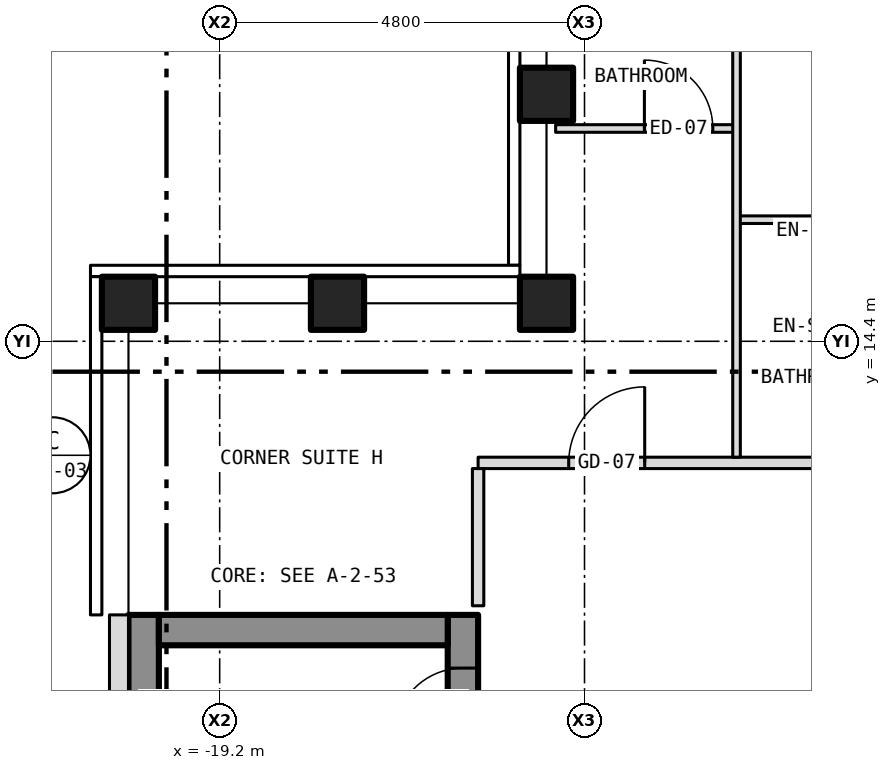
"""IFC4 building model, lengths in metres.
Left out: names, types, materials, properties, quantities, classifications, styles, units other than length and angle.
Written with IfcOpenShell. Run it as: python <this file> out.ifc"""

import sys

from ifc_helpers import new_model, si_unit, direction, frame, frame_2d, origin, origin_2d, place, context, subcontext, project, spatial, rectangle, hollow_rectangle, extrude, element, fill, save


model = new_model("IFC4")
c1 = context("Model", 3, precision=1e-05, world=origin(), true_north=direction((0.0, 1.0)))
c2 = subcontext(c1, "Body", "Model", "MODEL_VIEW")
j1 = project(units=[si_unit("LENGTHUNIT", "METRE"), si_unit("PLANEANGLEUNIT", "RADIAN")], contexts=[c1])
p1 = place(None, origin())
s1 = spatial("IfcSite", under=j1, at=p1, CompositionType="ELEMENT")
p2 = place(p1, origin())
s2 = spatial("IfcBuilding", under=s1, at=p2, CompositionType="ELEMENT")
p3 = place(p2, frame((0.0, 0.0, 194.5)))
s3 = spatial("IfcBuildingStorey", under=s2, at=p3, CompositionType="ELEMENT", Elevation=194.5)
for number, where, z_axis, x_axis in (
    (1, (-20.4, 14.9, -0.15), (0.0, 0.0, 1.0), (1.0, 0.0, 0.0)),
    (2, (-14.9, 14.9, -0.15), (0.0, 0.0, 1.0), (1.0, 0.0, 0.0)),
    (3, (-14.9, 17.65, -0.15), (0.0, 0.0, 1.0), (1.0, 0.0, 0.0)),
    (4, (-17.65, 14.9, -0.15), (0.0, 0.0, 1.0), (1.0, 0.0, 0.0)),
):
    element("IfcColumn", number, at=place(p3, frame(where, z_axis=z_axis, x_axis=x_axis)), inside=s3, PredefinedType="COLUMN", context=c2, shape_type="SweptSolid", body=[
        extrude(hollow_rectangle(XDim=0.7, YDim=0.7, WallThickness=0.04, at=origin_2d()), origin(), (0.0, 0.0, 1.0), 3.5),
    ])
p4 = place(p3, frame((-16.0, -10.8, 0.0), z_axis=(0.0, 0.0, 1.0), x_axis=(0.0, 1.0, 0.0)))
e5 = element("IfcWall", 5, at=p4, inside=s3, PredefinedType="SHEAR", context=c2, shape_type="SweptSolid", body=[
    extrude(rectangle(XDim=21.6, YDim=0.4, at=frame_2d((10.8, 0.0))), origin(), (0.0, 0.0, 1.0), 3.25),
])
p5 = place(p4, frame((9.4, 0.0, 0.0)))
e6 = element("IfcOpeningElement", 6, at=p5, cuts=e5, PredefinedType="OPENING", context=c2, shape_type="SweptSolid", body=[
    extrude(rectangle(XDim=1.1, YDim=2.1, at=frame_2d((0.55, 1.05))), frame((0.0, 0.212, 0.0), z_axis=(0.0, -1.0, 0.0), x_axis=(1.0, 0.0, 0.0)), (0.0, 0.0, 1.0), 0.424),
])
p6 = place(p4, frame((11.5, 0.0, 0.0)))
e7 = element("IfcOpeningElement", 7, at=p6, cuts=e5, PredefinedType="OPENING", context=c2, shape_type="SweptSolid", body=[
    extrude(rectangle(XDim=1.1, YDim=2.1, at=frame_2d((0.55, 1.05))), frame((0.0, 0.212, 0.0), z_axis=(0.0, -1.0, 0.0), x_axis=(1.0, 0.0, 0.0)), (0.0, 0.0, 1.0), 0.424),
])
p7 = place(p4, frame((13.6, 0.0, 0.0)))
e8 = element("IfcOpeningElement", 8, at=p7, cuts=e5, PredefinedType="OPENING", context=c2, shape_type="SweptSolid", body=[
    extrude(rectangle(XDim=1.1, YDim=2.1, at=frame_2d((0.55, 1.05))), frame((0.0, 0.212, 0.0), z_axis=(0.0, -1.0, 0.0), x_axis=(1.0, 0.0, 0.0)), (0.0, 0.0, 1.0), 0.424),
])
p8 = place(p4, frame((15.7, 0.0, 0.0)))
e9 = element("IfcOpeningElement", 9, at=p8, cuts=e5, PredefinedType="OPENING", context=c2, shape_type="SweptSolid", body=[
    extrude(rectangle(XDim=1.1, YDim=2.1, at=frame_2d((0.55, 1.05))), frame((0.0, 0.212, 0.0), z_axis=(0.0, -1.0, 0.0), x_axis=(1.0, 0.0, 0.0)), (0.0, 0.0, 1.0), 0.424),
])
p9 = place(p4, frame((17.8, 0.0, 0.0)))
e10 = element("IfcOpeningElement", 10, at=p9, cuts=e5, PredefinedType="OPENING", context=c2, shape_type="SweptSolid", body=[
    extrude(rectangle(XDim=1.1, YDim=2.1, at=frame_2d((0.55, 1.05))), frame((0.0, 0.212, 0.0), z_axis=(0.0, -1.0, 0.0), x_axis=(1.0, 0.0, 0.0)), (0.0, 0.0, 1.0), 0.424),
])
p10 = place(p4, frame((0.458, 0.0, 0.0)))
e11 = element("IfcOpeningElement", 11, at=p10, cuts=e5, PredefinedType="OPENING", context=c2, shape_type="SweptSolid", body=[
    extrude(rectangle(XDim=1.1, YDim=2.1, at=frame_2d((0.55, 1.05))), frame((0.0, 0.212, 0.0), z_axis=(0.0, -1.0, 0.0), x_axis=(1.0, 0.0, 0.0)), (0.0, 0.0, 1.0), 0.424),
])
p11 = place(p4, frame((7.5, 0.0, 0.0)))
e12 = element("IfcOpeningElement", 12, at=p11, cuts=e5, PredefinedType="OPENING", context=c2, shape_type="SweptSolid", body=[
    extrude(rectangle(XDim=1.1, YDim=2.1, at=frame_2d((0.55, 1.05))), frame((0.0, 0.212, 0.0), z_axis=(0.0, -1.0, 0.0), x_axis=(1.0, 0.0, 0.0)), (0.0, 0.0, 1.0), 0.424),
])
p12 = place(p4, frame((20.0, 0.0, 0.0)))
e13 = element("IfcOpeningElement", 13, at=p12, cuts=e5, PredefinedType="OPENING", context=c2, shape_type="SweptSolid", body=[
    extrude(rectangle(XDim=0.9, YDim=2.1, at=frame_2d((0.45, 1.05))), frame((0.0, 0.212, 0.0), z_axis=(0.0, -1.0, 0.0), x_axis=(1.0, 0.0, 0.0)), (0.0, 0.0, 1.0), 0.424),
])
p13 = place(p3, frame((-20.2, -10.8, 0.0), z_axis=(0.0, 0.0, 1.0), x_axis=(0.0, 1.0, 0.0)))
e14 = element("IfcWall", 14, at=p13, inside=s3, PredefinedType="SHEAR", context=c2, shape_type="SweptSolid", body=[
    extrude(rectangle(XDim=21.6, YDim=0.4, at=frame_2d((10.8, 0.0))), origin(), (0.0, 0.0, 1.0), 3.25),
])
p14 = place(p3, frame((-20.0, 10.6, 0.0), z_axis=(0.0, 0.0, 1.0), x_axis=(1.0, 0.0, 0.0)))
e15 = element("IfcWall", 15, at=p14, inside=s3, PredefinedType="SHEAR", context=c2, shape_type="SweptSolid", body=[
    extrude(rectangle(XDim=3.8, YDim=0.4, at=frame_2d((1.9, 0.0))), origin(), (0.0, 0.0, 1.0), 3.25),
])
p15 = place(p3, frame((-20.525, 10.8, 0.0), z_axis=(0.0, 0.0, 1.0), x_axis=(0.0, -1.0, 0.0)))
e16 = element("IfcWall", 16, at=p15, inside=s3, PredefinedType="SOLIDWALL", context=c2, shape_type="SweptSolid", body=[
    extrude(rectangle(XDim=21.6, YDim=0.25, at=frame_2d((10.8, 0.0))), origin(), (0.0, 0.0, 1.0), 3.5),
])
p16 = place(p15, frame((18.05, 0.0, 1.0)))
e17 = element("IfcOpeningElement", 17, at=p16, cuts=e16, PredefinedType="OPENING", context=c2, shape_type="SweptSolid", body=[
    extrude(rectangle(XDim=0.6, YDim=1.5, at=frame_2d((0.3, 0.75))), frame((0.0, 0.137, 0.0), z_axis=(0.0, -1.0, 0.0), x_axis=(1.0, 0.0, 0.0)), (0.0, 0.0, 1.0), 0.274),
])
p17 = place(p3, frame((-15.8, 12.8, 0.0), z_axis=(0.0, 0.0, 1.0), x_axis=(1.0, 0.0, 0.0)))
e18 = element("IfcWall", 18, at=p17, inside=s3, PredefinedType="PARTITIONING", context=c2, shape_type="SweptSolid", body=[
    extrude(rectangle(XDim=31.6, YDim=0.15, at=frame_2d((15.8, 0.0))), origin(), (0.0, 0.0, 1.0), 3.35),
])
p18 = place(p17, frame((7.708, 0.0, 0.0)))
e19 = element("IfcOpeningElement", 19, at=p18, cuts=e18, PredefinedType="OPENING", context=c2, shape_type="SweptSolid", body=[
    extrude(rectangle(XDim=1.0, YDim=2.1, at=frame_2d((0.5, 1.05))), frame((0.0, 0.087, 0.0), z_axis=(0.0, -1.0, 0.0), x_axis=(1.0, 0.0, 0.0)), (0.0, 0.0, 1.0), 0.174),
])
p19 = place(p17, frame((12.568, 0.0, 0.0)))
e20 = element("IfcOpeningElement", 20, at=p19, cuts=e18, PredefinedType="OPENING", context=c2, shape_type="SweptSolid", body=[
    extrude(rectangle(XDim=1.0, YDim=2.1, at=frame_2d((0.5, 1.05))), frame((0.0, 0.087, 0.0), z_axis=(0.0, -1.0, 0.0), x_axis=(1.0, 0.0, 0.0)), (0.0, 0.0, 1.0), 0.174),
])
p20 = place(p17, frame((22.892, 0.0, 0.0)))
e21 = element("IfcOpeningElement", 21, at=p20, cuts=e18, PredefinedType="OPENING", context=c2, shape_type="SweptSolid", body=[
    extrude(rectangle(XDim=1.0, YDim=2.1, at=frame_2d((0.5, 1.05))), frame((0.0, 0.087, 0.0), z_axis=(0.0, -1.0, 0.0), x_axis=(1.0, 0.0, 0.0)), (0.0, 0.0, 1.0), 0.174),
])
p21 = place(p17, frame((1.192, 0.0, 0.0)))
e22 = element("IfcOpeningElement", 22, at=p21, cuts=e18, PredefinedType="OPENING", context=c2, shape_type="SweptSolid", body=[
    extrude(rectangle(XDim=1.0, YDim=2.1, at=frame_2d((0.5, 1.05))), frame((0.0, 0.087, 0.0), z_axis=(0.0, -1.0, 0.0), x_axis=(1.0, 0.0, 0.0)), (0.0, 0.0, 1.0), 0.174),
])
p22 = place(p17, frame((29.409, 0.0, 0.0)))
e23 = element("IfcOpeningElement", 23, at=p22, cuts=e18, PredefinedType="OPENING", context=c2, shape_type="SweptSolid", body=[
    extrude(rectangle(XDim=1.0, YDim=2.1, at=frame_2d((0.5, 1.05))), frame((0.0, 0.087, 0.0), z_axis=(0.0, -1.0, 0.0), x_axis=(1.0, 0.0, 0.0)), (0.0, 0.0, 1.0), 0.174),
])
p23 = place(p3, frame((-12.4, 16.0, 0.0), z_axis=(0.0, 0.0, 1.0), x_axis=(1.0, 0.0, 0.0)))
e24 = element("IfcWall", 24, at=p23, inside=s3, PredefinedType="PARTITIONING", context=c2, shape_type="SweptSolid", body=[
    extrude(rectangle(XDim=2.2, YDim=0.1, at=frame_2d((1.1, 0.0))), origin(), (0.0, 0.0, 1.0), 3.35),
])
p24 = place(p3, frame((-14.78, 17.2, 0.0), z_axis=(0.0, 0.0, 1.0), x_axis=(1.0, 0.0, 0.0)))
e25 = element("IfcWall", 25, at=p24, inside=s3, PredefinedType="PARTITIONING", context=c2, shape_type="SweptSolid", body=[
    extrude(rectangle(XDim=2.38, YDim=0.1, at=frame_2d((1.19, 0.0))), origin(), (0.0, 0.0, 1.0), 3.35),
])
p25 = place(p24, frame((1.168, 0.0, 0.0)))
e26 = element("IfcOpeningElement", 26, at=p25, cuts=e25, PredefinedType="OPENING", context=c2, shape_type="SweptSolid", body=[
    extrude(rectangle(XDim=0.9, YDim=2.1, at=frame_2d((0.45, 1.05))), frame((0.0, 0.062, 0.0), z_axis=(0.0, -1.0, 0.0), x_axis=(1.0, 0.0, 0.0)), (0.0, 0.0, 1.0), 0.124),
])
p26 = place(p3, frame((-15.8, 10.92, 0.0), z_axis=(0.0, 0.0, 1.0), x_axis=(0.0, 1.0, 0.0)))
e27 = element("IfcWall", 27, at=p26, inside=s3, PredefinedType="PARTITIONING", context=c2, shape_type="SweptSolid", body=[
    extrude(rectangle(XDim=1.805, YDim=0.15, at=frame_2d((0.903, 0.0))), origin(), (0.0, 0.0, 1.0), 3.35),
])
p27 = place(p3, frame((-12.4, 12.875, 0.0), z_axis=(0.0, 0.0, 1.0), x_axis=(0.0, 1.0, 0.0)))
e28 = element("IfcWall", 28, at=p27, inside=s3, PredefinedType="PARTITIONING", context=c2, shape_type="SweptSolid", body=[
    extrude(rectangle(XDim=7.905, YDim=0.1, at=frame_2d((3.953, 0.0))), origin(), (0.0, 0.0, 1.0), 3.35),
])
p28 = place(p12, origin())
e29 = element("IfcDoor", 29, at=p28, inside=s3, OperationType="SINGLE_SWING_LEFT", PredefinedType="DOOR", context=c2, shape_type="SweptSolid", body=[
    extrude(rectangle(XDim=0.9, YDim=2.1, at=frame_2d((0.45, 1.05))), frame((0.0, 0.025, 0.0), z_axis=(0.0, -1.0, 0.0), x_axis=(1.0, 0.0, 0.0)), (0.0, 0.0, 1.0), 0.05),
])
fill(e13, e29)
p29 = place(p25, origin())
e30 = element("IfcDoor", 30, at=p29, inside=s3, OperationType="SINGLE_SWING_LEFT", PredefinedType="DOOR", context=c2, shape_type="SweptSolid", body=[
    extrude(rectangle(XDim=0.9, YDim=2.1, at=frame_2d((0.45, 1.05))), frame((0.0, 0.025, 0.0), z_axis=(0.0, -1.0, 0.0), x_axis=(1.0, 0.0, 0.0)), (0.0, 0.0, 1.0), 0.05),
])
fill(e26, e30)
p30 = place(p21, origin())
e31 = element("IfcDoor", 31, at=p30, inside=s3, OperationType="SINGLE_SWING_RIGHT", PredefinedType="DOOR", context=c2, shape_type="SweptSolid", body=[
    extrude(rectangle(XDim=1.0, YDim=2.1, at=frame_2d((0.5, 1.05))), frame((0.0, 0.025, 0.0), z_axis=(0.0, -1.0, 0.0), x_axis=(1.0, 0.0, 0.0)), (0.0, 0.0, 1.0), 0.05),
])
fill(e22, e31)
save(model, sys.argv[1])
